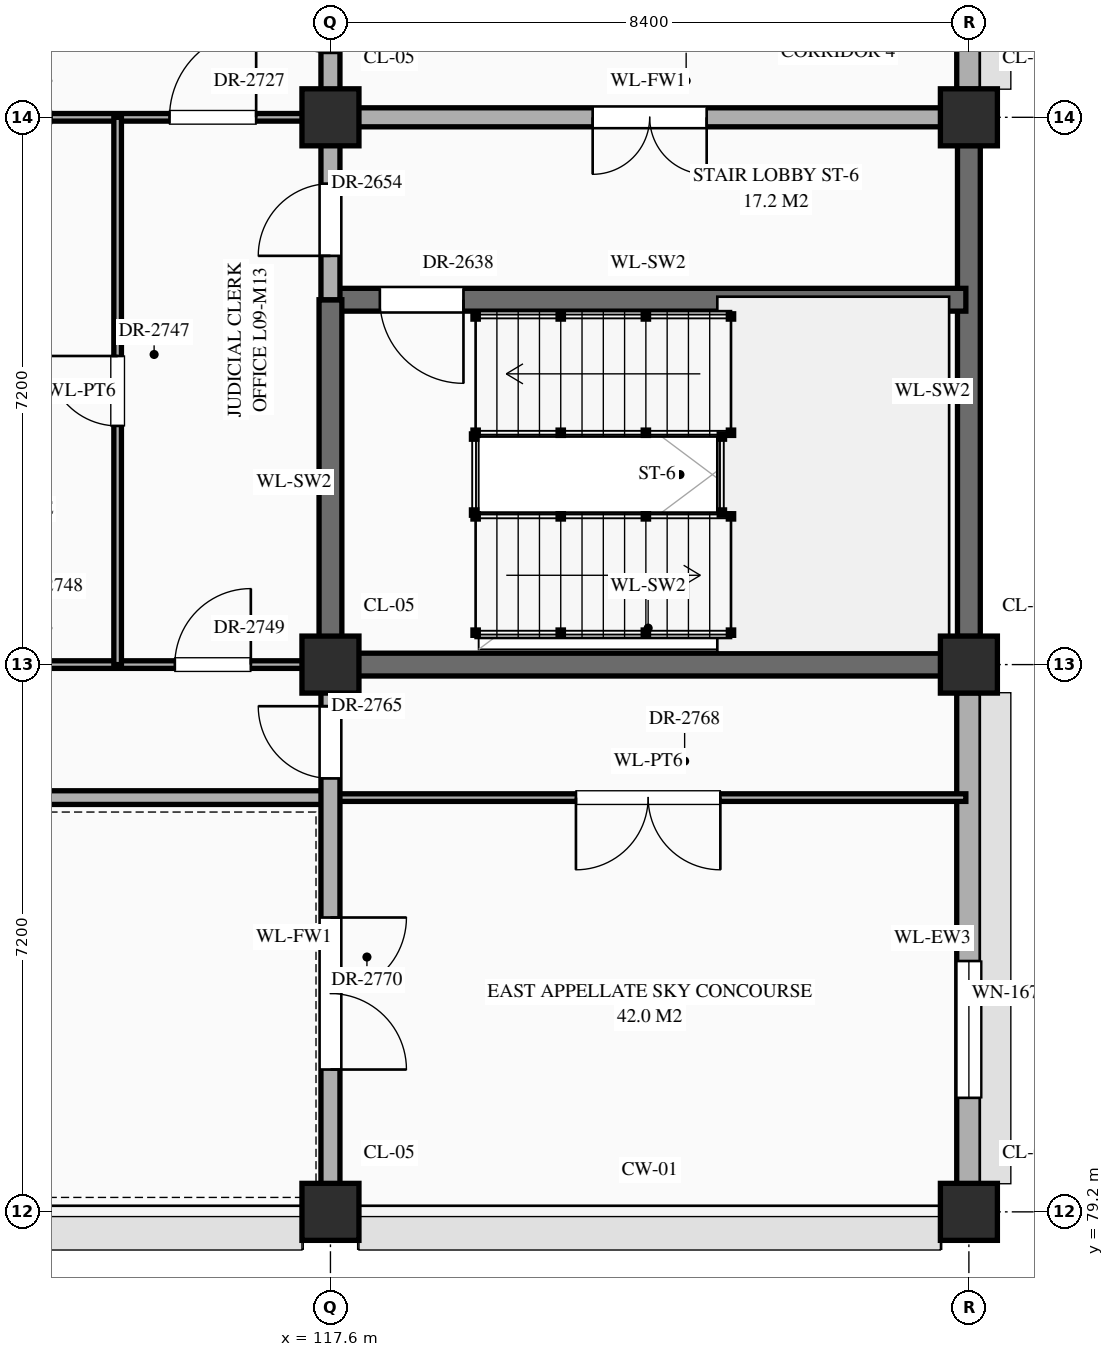
"""IFC4 building model, lengths in metres.
Left out: names, types, materials, properties, quantities, classifications, styles, units other than length and angle.
Written with IfcOpenShell. Run it as: python <this file> out.ifc"""

import sys

from ifc_helpers import new_model, si_unit, direction, frame, frame_2d, origin, origin_2d, place, context, subcontext, project, spatial, rectangle, extrude, element, fill, save


model = new_model("IFC4")
c1 = context("Model", 3, precision=1e-05, world=origin(), true_north=direction((0.0, 1.0)))
c2 = subcontext(c1, "Body", "Model", "MODEL_VIEW")
j1 = project(units=[si_unit("LENGTHUNIT", "METRE"), si_unit("PLANEANGLEUNIT", "RADIAN")], contexts=[c1])
p1 = place(None, origin())
s1 = spatial("IfcSite", under=j1, at=p1, CompositionType="ELEMENT")
p2 = place(p1, origin())
s2 = spatial("IfcBuilding", under=s1, at=p2, CompositionType="ELEMENT")
p3 = place(p2, frame((0.0, 0.0, 39.3)))
s3 = spatial("IfcBuildingStorey", under=s2, at=p3, CompositionType="ELEMENT", Elevation=39.3)
for number, where, z_axis, x_axis in (
    (1, (117.6, 79.2, 0.0), (0.0, 0.0, 1.0), (1.0, 0.0, 0.0)),
    (2, (117.6, 86.4, 0.0), (0.0, 0.0, 1.0), (1.0, 0.0, 0.0)),
    (3, (117.6, 93.6, 0.0), (0.0, 0.0, 1.0), (1.0, 0.0, 0.0)),
    (4, (126.0, 79.2, 0.0), (0.0, 0.0, 1.0), (1.0, 0.0, 0.0)),
    (5, (126.0, 86.4, 0.0), (0.0, 0.0, 1.0), (1.0, 0.0, 0.0)),
    (6, (126.0, 93.6, 0.0), (0.0, 0.0, 1.0), (1.0, 0.0, 0.0)),
):
    element("IfcColumn", number, at=place(p3, frame(where, z_axis=z_axis, x_axis=x_axis)), inside=s3, PredefinedType="COLUMN", context=c2, shape_type="SweptSolid", body=[
        extrude(rectangle(XDim=0.75, YDim=0.75, at=origin_2d()), origin(), (0.0, 0.0, 1.0), 4.2),
    ])
p4 = place(p3, frame((126.0, 79.57, 0.0), z_axis=(0.0, 0.0, 1.0), x_axis=(0.0, 1.0, 0.0)))
e7 = element("IfcWall", 7, at=p4, inside=s3, PredefinedType="STANDARD", context=c2, shape_type="SweptSolid", body=[
    extrude(rectangle(XDim=6.46, YDim=0.32, at=frame_2d((3.23, 0.0))), origin(), (0.0, 0.0, 1.0), 3.3),
])
p5 = place(p4, frame((1.13, 0.0, 0.85)))
e8 = element("IfcOpeningElement", 8, at=p5, cuts=e7, PredefinedType="OPENING", context=c2, shape_type="SweptSolid", body=[
    extrude(rectangle(XDim=1.8, YDim=2.12, at=frame_2d((0.9, 1.06))), frame((0.0, 0.172, 0.0), z_axis=(0.0, -1.0, 0.0), x_axis=(1.0, 0.0, 0.0)), (0.0, 0.0, 1.0), 0.344),
])
p6 = place(p3, frame((126.0, 86.77, 0.0), z_axis=(0.0, 0.0, 1.0), x_axis=(0.0, 1.0, 0.0)))
e9 = element("IfcWall", 9, at=p6, inside=s3, PredefinedType="SHEAR", context=c2, shape_type="SweptSolid", body=[
    extrude(rectangle(XDim=6.46, YDim=0.3, at=frame_2d((3.23, 0.0))), origin(), (0.0, 0.0, 1.0), 3.95),
])
p7 = place(p3, frame((126.0, 93.97, 0.0), z_axis=(0.0, 0.0, 1.0), x_axis=(0.0, 1.0, 0.0)))
e10 = element("IfcWall", 10, at=p7, inside=s3, PredefinedType="STANDARD", context=c2, shape_type="SweptSolid", body=[
    extrude(rectangle(XDim=6.46, YDim=0.32, at=frame_2d((3.23, 0.0))), origin(), (0.0, 0.0, 1.0), 3.3),
])
p8 = place(p7, frame((3.93, 0.0, 0.85)))
e11 = element("IfcOpeningElement", 11, at=p8, cuts=e10, PredefinedType="OPENING", context=c2, shape_type="SweptSolid", body=[
    extrude(rectangle(XDim=1.2, YDim=1.38, at=frame_2d((0.6, 0.69))), frame((0.0, 0.172, 0.0), z_axis=(0.0, -1.0, 0.0), x_axis=(1.0, 0.0, 0.0)), (0.0, 0.0, 1.0), 0.344),
])
p9 = place(p3, frame((100.8, 84.65, 0.0), z_axis=(0.0, 0.0, 1.0), x_axis=(1.0, 0.0, 0.0)))
e12 = element("IfcWall", 12, at=p9, inside=s3, PredefinedType="STANDARD", context=c2, shape_type="SweptSolid", body=[
    extrude(rectangle(XDim=16.8, YDim=0.18, at=frame_2d((8.4, 0.0))), origin(), (0.0, 0.0, 1.0), 3.95),
])
p10 = place(p9, frame((7.675, 0.0, 0.0)))
e13 = element("IfcOpeningElement", 13, at=p10, cuts=e12, PredefinedType="OPENING", context=c2, shape_type="SweptSolid", body=[
    extrude(rectangle(XDim=1.45, YDim=2.3, at=frame_2d((0.725, 1.15))), frame((0.0, 0.102, 0.0), z_axis=(0.0, -1.0, 0.0), x_axis=(1.0, 0.0, 0.0)), (0.0, 0.0, 1.0), 0.204),
])
p11 = place(p3, frame((117.6, 84.65, 0.0), z_axis=(0.0, 0.0, 1.0), x_axis=(1.0, 0.0, 0.0)))
e14 = element("IfcWall", 14, at=p11, inside=s3, PredefinedType="STANDARD", context=c2, shape_type="SweptSolid", body=[
    extrude(rectangle(XDim=8.36, YDim=0.1, at=frame_2d((4.18, 0.0))), origin(), (0.0, 0.0, 1.0), 3.95),
])
p12 = place(p11, frame((3.23, 0.0, 0.0)))
e15 = element("IfcOpeningElement", 15, at=p12, cuts=e14, PredefinedType="OPENING", context=c2, shape_type="SweptSolid", body=[
    extrude(rectangle(XDim=1.9, YDim=2.5, at=frame_2d((0.95, 1.25))), frame((0.0, 0.062, 0.0), z_axis=(0.0, -1.0, 0.0), x_axis=(1.0, 0.0, 0.0)), (0.0, 0.0, 1.0), 0.124),
])
p13 = place(p3, frame((109.2, 86.4, 0.0), z_axis=(0.0, 0.0, 1.0), x_axis=(1.0, 0.0, 0.0)))
e16 = element("IfcWall", 16, at=p13, inside=s3, PredefinedType="STANDARD", context=c2, shape_type="SweptSolid", body=[
    extrude(rectangle(XDim=8.4, YDim=0.1, at=frame_2d((4.2, 0.0))), origin(), (0.0, 0.0, 1.0), 3.1),
])
p14 = place(p13, frame((1.117, 0.0, 0.0)))
e17 = element("IfcOpeningElement", 17, at=p14, cuts=e16, PredefinedType="OPENING", context=c2, shape_type="SweptSolid", body=[
    extrude(rectangle(XDim=0.86, YDim=2.1, at=frame_2d((0.43, 1.05))), frame((0.0, 0.062, 0.0), z_axis=(0.0, -1.0, 0.0), x_axis=(1.0, 0.0, 0.0)), (0.0, 0.0, 1.0), 0.124),
])
p15 = place(p13, frame((3.72, 0.0, 0.0)))
e18 = element("IfcOpeningElement", 18, at=p15, cuts=e16, PredefinedType="OPENING", context=c2, shape_type="SweptSolid", body=[
    extrude(rectangle(XDim=0.96, YDim=2.2, at=frame_2d((0.48, 1.1))), frame((0.0, 0.062, 0.0), z_axis=(0.0, -1.0, 0.0), x_axis=(1.0, 0.0, 0.0)), (0.0, 0.0, 1.0), 0.124),
])
p16 = place(p13, frame((6.353, 0.0, 0.0)))
e19 = element("IfcOpeningElement", 19, at=p16, cuts=e16, PredefinedType="OPENING", context=c2, shape_type="SweptSolid", body=[
    extrude(rectangle(XDim=1.0, YDim=2.25, at=frame_2d((0.5, 1.125))), frame((0.0, 0.062, 0.0), z_axis=(0.0, -1.0, 0.0), x_axis=(1.0, 0.0, 0.0)), (0.0, 0.0, 1.0), 0.124),
])
p17 = place(p3, frame((117.6, 86.4, 0.0), z_axis=(0.0, 0.0, 1.0), x_axis=(1.0, 0.0, 0.0)))
e20 = element("IfcWall", 20, at=p17, inside=s3, PredefinedType="SHEAR", context=c2, shape_type="SweptSolid", body=[
    extrude(rectangle(XDim=8.36, YDim=0.3, at=frame_2d((4.18, 0.0))), origin(), (0.0, 0.0, 1.0), 3.95),
])
p18 = place(p3, frame((117.6, 91.2, 0.0), z_axis=(0.0, 0.0, 1.0), x_axis=(1.0, 0.0, 0.0)))
e21 = element("IfcWall", 21, at=p18, inside=s3, PredefinedType="SHEAR", context=c2, shape_type="SweptSolid", body=[
    extrude(rectangle(XDim=8.36, YDim=0.3, at=frame_2d((4.18, 0.0))), origin(), (0.0, 0.0, 1.0), 3.95),
])
p19 = place(p18, frame((0.65, 0.0, 0.0)))
e22 = element("IfcOpeningElement", 22, at=p19, cuts=e21, PredefinedType="OPENING", context=c2, shape_type="SweptSolid", body=[
    extrude(rectangle(XDim=1.1, YDim=2.2, at=frame_2d((0.55, 1.1))), frame((0.0, 0.162, 0.0), z_axis=(0.0, -1.0, 0.0), x_axis=(1.0, 0.0, 0.0)), (0.0, 0.0, 1.0), 0.324),
])
p20 = place(p3, frame((109.2, 93.6, 0.0), z_axis=(0.0, 0.0, 1.0), x_axis=(1.0, 0.0, 0.0)))
e23 = element("IfcWall", 23, at=p20, inside=s3, PredefinedType="STANDARD", context=c2, shape_type="SweptSolid", body=[
    extrude(rectangle(XDim=8.4, YDim=0.1, at=frame_2d((4.2, 0.0))), origin(), (0.0, 0.0, 1.0), 3.1),
])
p21 = place(p20, frame((1.038, 0.0, 0.0)))
e24 = element("IfcOpeningElement", 24, at=p21, cuts=e23, PredefinedType="OPENING", context=c2, shape_type="SweptSolid", body=[
    extrude(rectangle(XDim=1.02, YDim=2.4, at=frame_2d((0.51, 1.2))), frame((0.0, 0.062, 0.0), z_axis=(0.0, -1.0, 0.0), x_axis=(1.0, 0.0, 0.0)), (0.0, 0.0, 1.0), 0.124),
])
p22 = place(p20, frame((3.67, 0.0, 0.0)))
e25 = element("IfcOpeningElement", 25, at=p22, cuts=e23, PredefinedType="OPENING", context=c2, shape_type="SweptSolid", body=[
    extrude(rectangle(XDim=1.06, YDim=2.4, at=frame_2d((0.53, 1.2))), frame((0.0, 0.062, 0.0), z_axis=(0.0, -1.0, 0.0), x_axis=(1.0, 0.0, 0.0)), (0.0, 0.0, 1.0), 0.124),
])
p23 = place(p20, frame((6.282, 0.0, 0.0)))
e26 = element("IfcOpeningElement", 26, at=p23, cuts=e23, PredefinedType="OPENING", context=c2, shape_type="SweptSolid", body=[
    extrude(rectangle(XDim=1.14, YDim=2.4, at=frame_2d((0.57, 1.2))), frame((0.0, 0.062, 0.0), z_axis=(0.0, -1.0, 0.0), x_axis=(1.0, 0.0, 0.0)), (0.0, 0.0, 1.0), 0.124),
])
p24 = place(p3, frame((117.6, 93.6, 0.0), z_axis=(0.0, 0.0, 1.0), x_axis=(1.0, 0.0, 0.0)))
e27 = element("IfcWall", 27, at=p24, inside=s3, PredefinedType="STANDARD", context=c2, shape_type="SweptSolid", body=[
    extrude(rectangle(XDim=8.36, YDim=0.25, at=frame_2d((4.18, 0.0))), origin(), (0.0, 0.0, 1.0), 3.1),
])
p25 = place(p24, frame((3.45, 0.0, 0.0)))
e28 = element("IfcOpeningElement", 28, at=p25, cuts=e27, PredefinedType="OPENING", context=c2, shape_type="SweptSolid", body=[
    extrude(rectangle(XDim=1.5, YDim=2.25, at=frame_2d((0.75, 1.125))), frame((0.0, 0.137, 0.0), z_axis=(0.0, -1.0, 0.0), x_axis=(1.0, 0.0, 0.0)), (0.0, 0.0, 1.0), 0.274),
])
p26 = place(p3, frame((114.8, 86.4, 0.0), z_axis=(0.0, 0.0, 1.0), x_axis=(0.0, 1.0, 0.0)))
e29 = element("IfcWall", 29, at=p26, inside=s3, PredefinedType="STANDARD", context=c2, shape_type="SweptSolid", body=[
    extrude(rectangle(XDim=7.2, YDim=0.1, at=frame_2d((3.6, 0.0))), origin(), (0.0, 0.0, 1.0), 3.95),
])
p27 = place(p26, frame((3.14, 0.0, 0.0)))
e30 = element("IfcOpeningElement", 30, at=p27, cuts=e29, PredefinedType="OPENING", context=c2, shape_type="SweptSolid", body=[
    extrude(rectangle(XDim=0.92, YDim=2.15, at=frame_2d((0.46, 1.075))), frame((0.0, 0.062, 0.0), z_axis=(0.0, -1.0, 0.0), x_axis=(1.0, 0.0, 0.0)), (0.0, 0.0, 1.0), 0.124),
])
p28 = place(p3, frame((117.6, 79.24, 0.0), z_axis=(0.0, 0.0, 1.0), x_axis=(0.0, 1.0, 0.0)))
e31 = element("IfcWall", 31, at=p28, inside=s3, PredefinedType="STANDARD", context=c2, shape_type="SweptSolid", body=[
    extrude(rectangle(XDim=7.16, YDim=0.25, at=frame_2d((3.58, 0.0))), origin(), (0.0, 0.0, 1.0), 3.2),
])
p29 = place(p28, frame((5.663, 0.0, 0.0)))
e32 = element("IfcOpeningElement", 32, at=p29, cuts=e31, PredefinedType="OPENING", context=c2, shape_type="SweptSolid", body=[
    extrude(rectangle(XDim=0.95, YDim=2.15, at=frame_2d((0.475, 1.075))), frame((0.0, 0.137, 0.0), z_axis=(0.0, -1.0, 0.0), x_axis=(1.0, 0.0, 0.0)), (0.0, 0.0, 1.0), 0.274),
])
p30 = place(p28, frame((1.833, 0.0, 0.0)))
e33 = element("IfcOpeningElement", 33, at=p30, cuts=e31, PredefinedType="OPENING", context=c2, shape_type="SweptSolid", body=[
    extrude(rectangle(XDim=2.0, YDim=2.4, at=frame_2d((1.0, 1.2))), frame((0.0, 0.137, 0.0), z_axis=(0.0, -1.0, 0.0), x_axis=(1.0, 0.0, 0.0)), (0.0, 0.0, 1.0), 0.274),
])
p31 = place(p3, frame((117.6, 86.4, 0.0), z_axis=(0.0, 0.0, 1.0), x_axis=(0.0, 1.0, 0.0)))
e34 = element("IfcWall", 34, at=p31, inside=s3, PredefinedType="SHEAR", context=c2, shape_type="SweptSolid", body=[
    extrude(rectangle(XDim=4.8, YDim=0.3, at=frame_2d((2.4, 0.0))), origin(), (0.0, 0.0, 1.0), 3.95),
])
p32 = place(p3, frame((117.6, 91.2, 0.0), z_axis=(0.0, 0.0, 1.0), x_axis=(0.0, 1.0, 0.0)))
e35 = element("IfcWall", 35, at=p32, inside=s3, PredefinedType="STANDARD", context=c2, shape_type="SweptSolid", body=[
    extrude(rectangle(XDim=13.2, YDim=0.25, at=frame_2d((6.6, 0.0))), origin(), (0.0, 0.0, 1.0), 3.2),
])
p33 = place(p32, frame((0.577, 0.0, 0.0)))
e36 = element("IfcOpeningElement", 36, at=p33, cuts=e35, PredefinedType="OPENING", context=c2, shape_type="SweptSolid", body=[
    extrude(rectangle(XDim=0.95, YDim=2.15, at=frame_2d((0.475, 1.075))), frame((0.0, 0.137, 0.0), z_axis=(0.0, -1.0, 0.0), x_axis=(1.0, 0.0, 0.0)), (0.0, 0.0, 1.0), 0.274),
])
p34 = place(p32, frame((10.448, 0.0, 0.0)))
e37 = element("IfcOpeningElement", 37, at=p34, cuts=e35, PredefinedType="OPENING", context=c2, shape_type="SweptSolid", body=[
    extrude(rectangle(XDim=1.0, YDim=2.2, at=frame_2d((0.5, 1.1))), frame((0.0, 0.137, 0.0), z_axis=(0.0, -1.0, 0.0), x_axis=(1.0, 0.0, 0.0)), (0.0, 0.0, 1.0), 0.274),
])
p35 = place(p32, frame((3.248, 0.0, 0.0)))
e38 = element("IfcOpeningElement", 38, at=p35, cuts=e35, PredefinedType="OPENING", context=c2, shape_type="SweptSolid", body=[
    extrude(rectangle(XDim=1.0, YDim=2.2, at=frame_2d((0.5, 1.1))), frame((0.0, 0.137, 0.0), z_axis=(0.0, -1.0, 0.0), x_axis=(1.0, 0.0, 0.0)), (0.0, 0.0, 1.0), 0.274),
])
p36 = place(p5, origin())
e39 = element("IfcWindow", 39, at=p36, inside=s3, PartitioningType="SINGLE_PANEL", PredefinedType="WINDOW", context=c2, shape_type="SweptSolid", body=[
    extrude(rectangle(XDim=1.8, YDim=2.12, at=frame_2d((0.9, 1.06))), frame((0.0, 0.03, 0.0), z_axis=(0.0, -1.0, 0.0), x_axis=(1.0, 0.0, 0.0)), (0.0, 0.0, 1.0), 0.06),
])
fill(e8, e39)
p37 = place(p19, frame((1.1, 0.0, 0.0), z_axis=(0.0, 0.0, 1.0), x_axis=(-1.0, 0.0, 0.0)))
e40 = element("IfcDoor", 40, at=p37, inside=s3, OperationType="SINGLE_SWING_LEFT", PredefinedType="DOOR", context=c2, shape_type="SweptSolid", body=[
    extrude(rectangle(XDim=1.1, YDim=2.2, at=frame_2d((0.55, 1.1))), frame((0.0, 0.025, 0.0), z_axis=(0.0, -1.0, 0.0), x_axis=(1.0, 0.0, 0.0)), (0.0, 0.0, 1.0), 0.05),
])
fill(e22, e40)
p38 = place(p25, frame((1.5, 0.0, 0.0), z_axis=(0.0, 0.0, 1.0), x_axis=(-1.0, 0.0, 0.0)))
e41 = element("IfcDoor", 41, at=p38, inside=s3, OperationType="DOUBLE_DOOR_SINGLE_SWING", PredefinedType="DOOR", context=c2, shape_type="SweptSolid", body=[
    extrude(rectangle(XDim=1.5, YDim=2.25, at=frame_2d((0.75, 1.125))), frame((0.0, 0.025, 0.0), z_axis=(0.0, -1.0, 0.0), x_axis=(1.0, 0.0, 0.0)), (0.0, 0.0, 1.0), 0.05),
])
fill(e28, e41)
p39 = place(p33, origin())
e42 = element("IfcDoor", 42, at=p39, inside=s3, OperationType="SINGLE_SWING_LEFT", PredefinedType="DOOR", context=c2, shape_type="SweptSolid", body=[
    extrude(rectangle(XDim=0.95, YDim=2.15, at=frame_2d((0.475, 1.075))), frame((0.0, 0.025, 0.0), z_axis=(0.0, -1.0, 0.0), x_axis=(1.0, 0.0, 0.0)), (0.0, 0.0, 1.0), 0.05),
])
fill(e36, e42)
p40 = place(p35, origin())
e43 = element("IfcDoor", 43, at=p40, inside=s3, OperationType="SINGLE_SWING_RIGHT", PredefinedType="DOOR", context=c2, shape_type="SweptSolid", body=[
    extrude(rectangle(XDim=1.0, YDim=2.2, at=frame_2d((0.5, 1.1))), frame((0.0, 0.025, 0.0), z_axis=(0.0, -1.0, 0.0), x_axis=(1.0, 0.0, 0.0)), (0.0, 0.0, 1.0), 0.05),
])
fill(e38, e43)
p41 = place(p23, origin())
e44 = element("IfcDoor", 44, at=p41, inside=s3, OperationType="SINGLE_SWING_RIGHT", PredefinedType="DOOR", context=c2, shape_type="SweptSolid", body=[
    extrude(rectangle(XDim=1.14, YDim=2.4, at=frame_2d((0.57, 1.2))), frame((0.0, 0.025, 0.0), z_axis=(0.0, -1.0, 0.0), x_axis=(1.0, 0.0, 0.0)), (0.0, 0.0, 1.0), 0.05),
])
fill(e26, e44)
p42 = place(p27, origin())
e45 = element("IfcDoor", 45, at=p42, inside=s3, OperationType="SINGLE_SWING_RIGHT", PredefinedType="DOOR", context=c2, shape_type="SweptSolid", body=[
    extrude(rectangle(XDim=0.92, YDim=2.15, at=frame_2d((0.46, 1.075))), frame((0.0, 0.025, 0.0), z_axis=(0.0, -1.0, 0.0), x_axis=(1.0, 0.0, 0.0)), (0.0, 0.0, 1.0), 0.05),
])
fill(e30, e45)
p43 = place(p16, origin())
e46 = element("IfcDoor", 46, at=p43, inside=s3, OperationType="SINGLE_SWING_RIGHT", PredefinedType="DOOR", context=c2, shape_type="SweptSolid", body=[
    extrude(rectangle(XDim=1.0, YDim=2.25, at=frame_2d((0.5, 1.125))), frame((0.0, 0.025, 0.0), z_axis=(0.0, -1.0, 0.0), x_axis=(1.0, 0.0, 0.0)), (0.0, 0.0, 1.0), 0.05),
])
fill(e19, e46)
p44 = place(p29, origin())
e47 = element("IfcDoor", 47, at=p44, inside=s3, OperationType="SINGLE_SWING_RIGHT", PredefinedType="DOOR", context=c2, shape_type="SweptSolid", body=[
    extrude(rectangle(XDim=0.95, YDim=2.15, at=frame_2d((0.475, 1.075))), frame((0.0, 0.025, 0.0), z_axis=(0.0, -1.0, 0.0), x_axis=(1.0, 0.0, 0.0)), (0.0, 0.0, 1.0), 0.05),
])
fill(e32, e47)
p45 = place(p12, frame((1.9, 0.0, 0.0), z_axis=(0.0, 0.0, 1.0), x_axis=(-1.0, 0.0, 0.0)))
e48 = element("IfcDoor", 48, at=p45, inside=s3, OperationType="DOUBLE_DOOR_SINGLE_SWING", PredefinedType="DOOR", context=c2, shape_type="SweptSolid", body=[
    extrude(rectangle(XDim=1.9, YDim=2.5, at=frame_2d((0.95, 1.25))), frame((0.0, 0.025, 0.0), z_axis=(0.0, -1.0, 0.0), x_axis=(1.0, 0.0, 0.0)), (0.0, 0.0, 1.0), 0.05),
])
fill(e15, e48)
p46 = place(p30, frame((2.0, 0.0, 0.0), z_axis=(0.0, 0.0, 1.0), x_axis=(-1.0, 0.0, 0.0)))
e49 = element("IfcDoor", 49, at=p46, inside=s3, OperationType="DOUBLE_DOOR_SINGLE_SWING", PredefinedType="DOOR", context=c2, shape_type="SweptSolid", body=[
    extrude(rectangle(XDim=2.0, YDim=2.4, at=frame_2d((1.0, 1.2))), frame((0.0, 0.025, 0.0), z_axis=(0.0, -1.0, 0.0), x_axis=(1.0, 0.0, 0.0)), (0.0, 0.0, 1.0), 0.05),
])
fill(e33, e49)
save(model, sys.argv[1])
